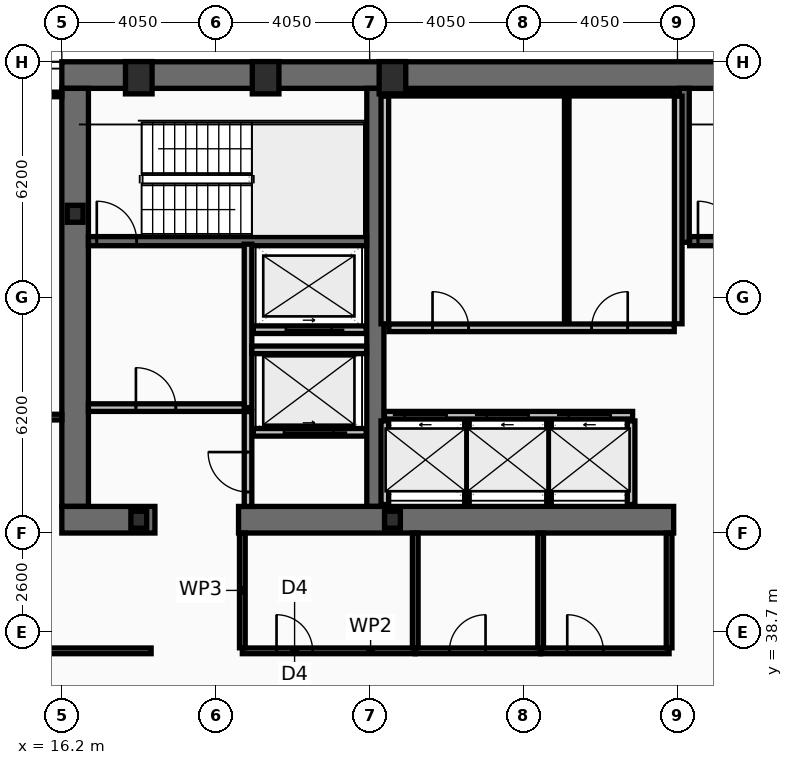
"""IFC4 building model, lengths in metres.
Left out: names, types, materials, properties, quantities, classifications, styles, units other than length and angle.
Written with IfcOpenShell. Run it as: python <this file> out.ifc"""

import sys

from ifc_helpers import new_model, si_unit, direction, frame, frame_2d, origin, origin_2d, place, context, subcontext, project, spatial, rectangle, hollow_rectangle, i_section, extrude, element, fill, save


model = new_model("IFC4")
c1 = context("Model", 3, precision=1e-05, world=origin(), true_north=direction((0.0, 1.0)))
c2 = subcontext(c1, "Body", "Model", "MODEL_VIEW")
j1 = project(units=[si_unit("LENGTHUNIT", "METRE"), si_unit("PLANEANGLEUNIT", "RADIAN")], contexts=[c1])
p1 = place(None, origin())
s1 = spatial("IfcSite", under=j1, at=p1, CompositionType="ELEMENT")
p2 = place(p1, origin())
s2 = spatial("IfcBuilding", under=s1, at=p2, CompositionType="ELEMENT")
p3 = place(p2, frame((0.0, 0.0, 150.6)))
s3 = spatial("IfcBuildingStorey", under=s2, at=p3, CompositionType="ELEMENT", Elevation=150.6)
p4 = place(p3, frame((16.2, 53.35, 0.0), z_axis=(0.0, 0.0, 1.0), x_axis=(1.0, 0.0, 0.0)))
e1 = element("IfcWall", 1, at=p4, inside=s3, PredefinedType="SHEAR", context=c2, shape_type="SweptSolid", body=[
    extrude(rectangle(XDim=40.5, YDim=0.7, at=frame_2d((20.25, 0.0))), origin(), (0.0, 0.0, 1.0), 3.44),
])
p5 = place(p3, frame((16.55, 42.0, 0.0), z_axis=(0.0, 0.0, 1.0), x_axis=(0.0, 1.0, 0.0)))
e2 = element("IfcWall", 2, at=p5, inside=s3, PredefinedType="SHEAR", context=c2, shape_type="SweptSolid", body=[
    extrude(rectangle(XDim=11.0, YDim=0.7, at=frame_2d((5.5, 0.0))), origin(), (0.0, 0.0, 1.0), 3.44),
])
p6 = place(p3, frame((24.45, 42.0, 0.0), z_axis=(0.0, 0.0, 1.0), x_axis=(0.0, 1.0, 0.0)))
e3 = element("IfcWall", 3, at=p6, inside=s3, PredefinedType="SHEAR", context=c2, shape_type="SweptSolid", body=[
    extrude(rectangle(XDim=11.0, YDim=0.45, at=frame_2d((5.5, 0.0))), origin(), (0.0, 0.0, 1.0), 3.44),
])
p7 = place(p3, frame((18.65, 41.65, 0.0), z_axis=(0.0, 0.0, 1.0), x_axis=(-1.0, 0.0, 0.0)))
e4 = element("IfcWall", 4, at=p7, inside=s3, PredefinedType="SHEAR", context=c2, shape_type="SweptSolid", body=[
    extrude(rectangle(XDim=2.45, YDim=0.7, at=frame_2d((1.225, 0.0))), origin(), (0.0, 0.0, 1.0), 3.44),
])
p8 = place(p3, frame((32.3, 41.65, 0.0), z_axis=(0.0, 0.0, 1.0), x_axis=(-1.0, 0.0, 0.0)))
e5 = element("IfcWall", 5, at=p8, inside=s3, PredefinedType="SHEAR", context=c2, shape_type="SweptSolid", body=[
    extrude(rectangle(XDim=11.45, YDim=0.7, at=frame_2d((5.725, 0.0))), origin(), (0.0, 0.0, 1.0), 3.44),
])
p9 = place(p3, frame((32.58, 48.95, 0.0), z_axis=(0.0, 0.0, 1.0), x_axis=(0.0, 1.0, 0.0)))
e6 = element("IfcWall", 6, at=p9, inside=s3, PredefinedType="SHEAR", context=c2, shape_type="SweptSolid", body=[
    extrude(rectangle(XDim=4.05, YDim=0.26, at=frame_2d((2.025, 0.0))), origin(), (0.0, 0.0, 1.0), 3.44),
])
p10 = place(p3, frame((16.9, 48.98, 0.0), z_axis=(0.0, 0.0, 1.0), x_axis=(1.0, 0.0, 0.0)))
e7 = element("IfcWall", 7, at=p10, inside=s3, PredefinedType="SHEAR", context=c2, shape_type="SweptSolid", body=[
    extrude(rectangle(XDim=7.32, YDim=0.24, at=frame_2d((3.66, 0.0))), origin(), (0.0, 0.0, 1.0), 3.44),
])
p11 = place(p10, frame((0.22, 0.0, 0.0)))
e8 = element("IfcOpeningElement", 8, at=p11, cuts=e7, PredefinedType="OPENING", context=c2, shape_type="SweptSolid", body=[
    extrude(rectangle(XDim=1.05, YDim=2.15, at=frame_2d((0.525, 1.075))), frame((0.0, 0.13, 0.0), z_axis=(0.0, -1.0, 0.0), x_axis=(1.0, 0.0, 0.0)), (0.0, 0.0, 1.0), 0.26),
])
p12 = place(p3, frame((32.72, 48.98, 0.0), z_axis=(0.0, 0.0, 1.0), x_axis=(1.0, 0.0, 0.0)))
e9 = element("IfcWall", 9, at=p12, inside=s3, PredefinedType="SHEAR", context=c2, shape_type="SweptSolid", body=[
    extrude(rectangle(XDim=7.56, YDim=0.24, at=frame_2d((3.78, 0.0))), origin(), (0.0, 0.0, 1.0), 3.44),
])
p13 = place(p12, frame((0.22, 0.0, 0.0)))
e10 = element("IfcOpeningElement", 10, at=p13, cuts=e9, PredefinedType="OPENING", context=c2, shape_type="SweptSolid", body=[
    extrude(rectangle(XDim=1.05, YDim=2.15, at=frame_2d((0.525, 1.075))), frame((0.0, 0.13, 0.0), z_axis=(0.0, -1.0, 0.0), x_axis=(1.0, 0.0, 0.0)), (0.0, 0.0, 1.0), 0.26),
])
for number, where, z_axis, x_axis in (
    (11, (18.225, 53.28, 0.0), (0.0, 0.0, 1.0), (1.0, 0.0, 0.0)),
    (12, (21.562, 53.28, 0.0), (0.0, 0.0, 1.0), (1.0, 0.0, 0.0)),
    (13, (24.9, 53.28, 0.0), (0.0, 0.0, 1.0), (1.0, 0.0, 0.0)),
):
    element("IfcColumn", number, at=place(p3, frame(where, z_axis=z_axis, x_axis=x_axis)), inside=s3, PredefinedType="COLUMN", context=c2, shape_type="SweptSolid", body=[
        extrude(hollow_rectangle(XDim=0.7, YDim=0.85, WallThickness=0.05, at=origin_2d()), origin(), (0.0, 0.0, 1.0), 3.6),
    ])
for number, where, z_axis, x_axis in (
    (14, (16.55, 49.7, 0.0), (0.0, 0.0, 1.0), (1.0, 0.0, 0.0)),
    (15, (18.225, 41.65, 0.0), (0.0, 0.0, 1.0), (1.0, 0.0, 0.0)),
    (16, (24.9, 41.65, 0.0), (0.0, 0.0, 1.0), (1.0, 0.0, 0.0)),
):
    element("IfcColumn", number, at=place(p3, frame(where, z_axis=z_axis, x_axis=x_axis)), inside=s3, PredefinedType="COLUMN", context=c2, shape_type="SweptSolid", body=[
        extrude(i_section(OverallWidth=0.416, OverallDepth=0.446, WebThickness=0.039, FlangeThickness=0.063, at=origin_2d()), origin(), (0.0, 0.0, 1.0), 3.6),
    ])
p14 = place(p3, frame((24.69, 44.4, 0.0), z_axis=(0.0, 0.0, 1.0), x_axis=(1.0, 0.0, 0.0)))
e17 = element("IfcWall", 17, at=p14, inside=s3, PredefinedType="PARTITIONING", context=c2, shape_type="SweptSolid", body=[
    extrude(rectangle(XDim=6.53, YDim=0.2, at=frame_2d((3.265, 0.0))), origin(), (0.0, 0.0, 1.0), 3.44),
])
p15 = place(p14, frame((0.53, 0.0, 0.0)))
e18 = element("IfcOpeningElement", 18, at=p15, cuts=e17, PredefinedType="OPENING", context=c2, shape_type="SweptSolid", body=[
    extrude(rectangle(XDim=1.1, YDim=2.18, at=frame_2d((0.55, 1.09))), frame((0.0, 0.11, 0.0), z_axis=(0.0, -1.0, 0.0), x_axis=(1.0, 0.0, 0.0)), (0.0, 0.0, 1.0), 0.22),
])
p16 = place(p14, frame((2.69, 0.0, 0.0)))
e19 = element("IfcOpeningElement", 19, at=p16, cuts=e17, PredefinedType="OPENING", context=c2, shape_type="SweptSolid", body=[
    extrude(rectangle(XDim=1.1, YDim=2.18, at=frame_2d((0.55, 1.09))), frame((0.0, 0.11, 0.0), z_axis=(0.0, -1.0, 0.0), x_axis=(1.0, 0.0, 0.0)), (0.0, 0.0, 1.0), 0.22),
])
p17 = place(p14, frame((4.85, 0.0, 0.0)))
e20 = element("IfcOpeningElement", 20, at=p17, cuts=e17, PredefinedType="OPENING", context=c2, shape_type="SweptSolid", body=[
    extrude(rectangle(XDim=1.1, YDim=2.18, at=frame_2d((0.55, 1.09))), frame((0.0, 0.11, 0.0), z_axis=(0.0, -1.0, 0.0), x_axis=(1.0, 0.0, 0.0)), (0.0, 0.0, 1.0), 0.22),
])
p18 = place(p3, frame((24.21, 43.95, 0.0), z_axis=(0.0, 0.0, 1.0), x_axis=(-1.0, 0.0, 0.0)))
e21 = element("IfcWall", 21, at=p18, inside=s3, PredefinedType="PARTITIONING", context=c2, shape_type="SweptSolid", body=[
    extrude(rectangle(XDim=2.97, YDim=0.2, at=frame_2d((1.485, 0.0))), origin(), (0.0, 0.0, 1.0), 3.44),
])
p19 = place(p18, frame((0.86, 0.0, 0.0)))
e22 = element("IfcOpeningElement", 22, at=p19, cuts=e21, PredefinedType="OPENING", context=c2, shape_type="SweptSolid", body=[
    extrude(rectangle(XDim=1.3, YDim=2.18, at=frame_2d((0.65, 1.09))), frame((0.0, 0.11, 0.0), z_axis=(0.0, -1.0, 0.0), x_axis=(1.0, 0.0, 0.0)), (0.0, 0.0, 1.0), 0.22),
])
p20 = place(p3, frame((24.21, 46.65, 0.0), z_axis=(0.0, 0.0, 1.0), x_axis=(-1.0, 0.0, 0.0)))
e23 = element("IfcWall", 23, at=p20, inside=s3, PredefinedType="PARTITIONING", context=c2, shape_type="SweptSolid", body=[
    extrude(rectangle(XDim=2.97, YDim=0.2, at=frame_2d((1.485, 0.0))), origin(), (0.0, 0.0, 1.0), 3.44),
])
p21 = place(p20, frame((0.91, 0.0, 0.0)))
e24 = element("IfcOpeningElement", 24, at=p21, cuts=e23, PredefinedType="OPENING", context=c2, shape_type="SweptSolid", body=[
    extrude(rectangle(XDim=1.2, YDim=2.18, at=frame_2d((0.6, 1.09))), frame((0.0, 0.11, 0.0), z_axis=(0.0, -1.0, 0.0), x_axis=(1.0, 0.0, 0.0)), (0.0, 0.0, 1.0), 0.22),
])
p22 = place(p3, frame((21.1, 44.6, 0.0), z_axis=(0.0, 0.0, 1.0), x_axis=(0.0, 1.0, 0.0)))
e25 = element("IfcWall", 25, at=p22, inside=s3, PredefinedType="PARTITIONING", context=c2, shape_type="SweptSolid", body=[
    extrude(rectangle(XDim=4.3, YDim=0.2, at=frame_2d((2.15, 0.0))), origin(), (0.0, 0.0, 1.0), 3.44),
])
p23 = place(p3, frame((16.9, 44.6, 0.0), z_axis=(0.0, 0.0, 1.0), x_axis=(1.0, 0.0, 0.0)))
e26 = element("IfcWall", 26, at=p23, inside=s3, PredefinedType="PARTITIONING", context=c2, shape_type="SweptSolid", body=[
    extrude(rectangle(XDim=4.1, YDim=0.2, at=frame_2d((2.05, 0.0))), origin(), (0.0, 0.0, 1.0), 3.44),
])
p24 = place(p23, frame((1.25, 0.0, 0.0)))
e27 = element("IfcOpeningElement", 27, at=p24, cuts=e26, PredefinedType="OPENING", context=c2, shape_type="SweptSolid", body=[
    extrude(rectangle(XDim=1.05, YDim=2.15, at=frame_2d((0.525, 1.075))), frame((0.0, 0.11, 0.0), z_axis=(0.0, -1.0, 0.0), x_axis=(1.0, 0.0, 0.0)), (0.0, 0.0, 1.0), 0.22),
])
p25 = place(p3, frame((21.2, 46.12, 0.0), z_axis=(0.0, 0.0, 1.0), x_axis=(1.0, 0.0, 0.0)))
e28 = element("IfcWall", 28, at=p25, inside=s3, PredefinedType="PARTITIONING", context=c2, shape_type="SweptSolid", body=[
    extrude(rectangle(XDim=3.02, YDim=0.2, at=frame_2d((1.51, 0.0))), origin(), (0.0, 0.0, 1.0), 3.44),
])
p26 = place(p3, frame((21.1, 42.0, 0.0), z_axis=(0.0, 0.0, 1.0), x_axis=(0.0, 1.0, 0.0)))
e29 = element("IfcWall", 29, at=p26, inside=s3, PredefinedType="PARTITIONING", context=c2, shape_type="SweptSolid", body=[
    extrude(rectangle(XDim=2.495, YDim=0.2, at=frame_2d((1.248, 0.0))), origin(), (0.0, 0.0, 1.0), 3.44),
])
p27 = place(p26, frame((0.38, 0.0, 0.0)))
e30 = element("IfcOpeningElement", 30, at=p27, cuts=e29, PredefinedType="OPENING", context=c2, shape_type="SweptSolid", body=[
    extrude(rectangle(XDim=1.05, YDim=2.15, at=frame_2d((0.525, 1.075))), frame((0.0, 0.11, 0.0), z_axis=(0.0, -1.0, 0.0), x_axis=(1.0, 0.0, 0.0)), (0.0, 0.0, 1.0), 0.22),
])
for number, where, z_axis, x_axis in (
    (31, (24.7, 46.805, 0.0), (0.0, 0.0, 1.0), (0.0, 1.0, 0.0)),
    (32, (32.42, 46.805, 0.0), (0.0, 0.0, 1.0), (0.0, 1.0, 0.0)),
):
    element("IfcWall", number, at=place(p3, frame(where, z_axis=z_axis, x_axis=x_axis)), inside=s3, PredefinedType="PARTITIONING", context=c2, shape_type="SweptSolid", body=[
        extrude(rectangle(XDim=5.99, YDim=0.2, at=frame_2d((2.995, 0.0))), origin(), (0.0, 0.0, 1.0), 3.44),
    ])
p28 = place(p3, frame((24.805, 52.86, 0.0), z_axis=(0.0, 0.0, 1.0), x_axis=(1.0, 0.0, 0.0)))
e33 = element("IfcWall", 33, at=p28, inside=s3, PredefinedType="PARTITIONING", context=c2, shape_type="SweptSolid", body=[
    extrude(rectangle(XDim=7.51, YDim=0.12, at=frame_2d((3.755, 0.0))), origin(), (0.0, 0.0, 1.0), 3.44),
])
p29 = place(p3, frame((29.486, 46.805, 0.0), z_axis=(0.0, 0.0, 1.0), x_axis=(0.0, 1.0, 0.0)))
e34 = element("IfcWall", 34, at=p29, inside=s3, PredefinedType="PARTITIONING", context=c2, shape_type="SweptSolid", body=[
    extrude(rectangle(XDim=5.99, YDim=0.12, at=frame_2d((2.995, 0.0))), origin(), (0.0, 0.0, 1.0), 3.44),
])
p30 = place(p3, frame((24.805, 46.7, 0.0), z_axis=(0.0, 0.0, 1.0), x_axis=(1.0, 0.0, 0.0)))
e35 = element("IfcWall", 35, at=p30, inside=s3, PredefinedType="PARTITIONING", context=c2, shape_type="SweptSolid", body=[
    extrude(rectangle(XDim=7.51, YDim=0.2, at=frame_2d((3.755, 0.0))), origin(), (0.0, 0.0, 1.0), 3.44),
])
p31 = place(p30, frame((1.15, 0.0, 0.0)))
e36 = element("IfcOpeningElement", 36, at=p31, cuts=e35, PredefinedType="OPENING", context=c2, shape_type="SweptSolid", body=[
    extrude(rectangle(XDim=0.95, YDim=2.1, at=frame_2d((0.475, 1.05))), frame((0.0, 0.11, 0.0), z_axis=(0.0, -1.0, 0.0), x_axis=(1.0, 0.0, 0.0)), (0.0, 0.0, 1.0), 0.22),
])
p32 = place(p30, frame((5.336, 0.0, 0.0)))
e37 = element("IfcOpeningElement", 37, at=p32, cuts=e35, PredefinedType="OPENING", context=c2, shape_type="SweptSolid", body=[
    extrude(rectangle(XDim=0.95, YDim=2.1, at=frame_2d((0.475, 1.05))), frame((0.0, 0.11, 0.0), z_axis=(0.0, -1.0, 0.0), x_axis=(1.0, 0.0, 0.0)), (0.0, 0.0, 1.0), 0.22),
])
for number, where, z_axis, x_axis in (
    (38, (24.7, 42.05, 0.0), (0.0, 0.0, 1.0), (0.0, 1.0, 0.0)),
    (39, (31.18, 42.05, 0.0), (0.0, 0.0, 1.0), (0.0, 1.0, 0.0)),
):
    element("IfcWall", number, at=place(p3, frame(where, z_axis=z_axis, x_axis=x_axis)), inside=s3, PredefinedType="PARTITIONING", context=c2, shape_type="SweptSolid", body=[
        extrude(rectangle(XDim=2.2, YDim=0.2, at=frame_2d((1.1, 0.0))), origin(), (0.0, 0.0, 1.0), 3.44),
    ])
for number, where, z_axis, x_axis in (
    (40, (26.86, 42.05, 0.0), (0.0, 0.0, 1.0), (0.0, 1.0, 0.0)),
    (41, (29.02, 42.05, 0.0), (0.0, 0.0, 1.0), (0.0, 1.0, 0.0)),
):
    element("IfcWall", number, at=place(p3, frame(where, z_axis=z_axis, x_axis=x_axis)), inside=s3, PredefinedType="PARTITIONING", context=c2, shape_type="SweptSolid", body=[
        extrude(rectangle(XDim=2.2, YDim=0.12, at=frame_2d((1.1, 0.0))), origin(), (0.0, 0.0, 1.0), 3.44),
    ])
p33 = place(p3, frame((20.95, 38.2, 0.0), z_axis=(0.0, 0.0, 1.0), x_axis=(1.0, 0.0, 0.0)))
e42 = element("IfcWall", 42, at=p33, inside=s3, PredefinedType="PARTITIONING", context=c2, shape_type="SweptSolid", body=[
    extrude(rectangle(XDim=4.55, YDim=0.15, at=frame_2d((2.275, 0.0))), origin(), (0.0, 0.0, 1.0), 2.73),
])
p34 = place(p33, frame((0.9, 0.0, 0.0)))
e43 = element("IfcOpeningElement", 43, at=p34, cuts=e42, PredefinedType="OPENING", context=c2, shape_type="SweptSolid", body=[
    extrude(rectangle(XDim=0.95, YDim=2.05, at=frame_2d((0.475, 1.025))), frame((0.0, 0.085, 0.0), z_axis=(0.0, -1.0, 0.0), x_axis=(1.0, 0.0, 0.0)), (0.0, 0.0, 1.0), 0.17),
])
p35 = place(p3, frame((25.5, 38.2, 0.0), z_axis=(0.0, 0.0, 1.0), x_axis=(1.0, 0.0, 0.0)))
e44 = element("IfcWall", 44, at=p35, inside=s3, PredefinedType="PARTITIONING", context=c2, shape_type="SweptSolid", body=[
    extrude(rectangle(XDim=3.3, YDim=0.15, at=frame_2d((1.65, 0.0))), origin(), (0.0, 0.0, 1.0), 3.44),
])
p36 = place(p35, frame((0.9, 0.0, 0.0)))
e45 = element("IfcOpeningElement", 45, at=p36, cuts=e44, PredefinedType="OPENING", context=c2, shape_type="SweptSolid", body=[
    extrude(rectangle(XDim=0.95, YDim=2.05, at=frame_2d((0.475, 1.025))), frame((0.0, 0.085, 0.0), z_axis=(0.0, -1.0, 0.0), x_axis=(1.0, 0.0, 0.0)), (0.0, 0.0, 1.0), 0.17),
])
p37 = place(p3, frame((28.8, 38.2, 0.0), z_axis=(0.0, 0.0, 1.0), x_axis=(1.0, 0.0, 0.0)))
e46 = element("IfcWall", 46, at=p37, inside=s3, PredefinedType="PARTITIONING", context=c2, shape_type="SweptSolid", body=[
    extrude(rectangle(XDim=3.38, YDim=0.15, at=frame_2d((1.69, 0.0))), origin(), (0.0, 0.0, 1.0), 2.73),
])
p38 = place(p37, frame((0.7, 0.0, 0.0)))
e47 = element("IfcOpeningElement", 47, at=p38, cuts=e46, PredefinedType="OPENING", context=c2, shape_type="SweptSolid", body=[
    extrude(rectangle(XDim=0.95, YDim=2.05, at=frame_2d((0.475, 1.025))), frame((0.0, 0.085, 0.0), z_axis=(0.0, -1.0, 0.0), x_axis=(1.0, 0.0, 0.0)), (0.0, 0.0, 1.0), 0.17),
])
for number, where, z_axis, x_axis in (
    (48, (20.95, 38.28, 0.0), (0.0, 0.0, 1.0), (0.0, 1.0, 0.0)),
    (49, (25.5, 38.28, 0.0), (0.0, 0.0, 1.0), (0.0, 1.0, 0.0)),
    (50, (28.8, 38.28, 0.0), (0.0, 0.0, 1.0), (0.0, 1.0, 0.0)),
    (51, (32.18, 38.28, 0.0), (0.0, 0.0, 1.0), (0.0, 1.0, 0.0)),
):
    element("IfcWall", number, at=place(p3, frame(where, z_axis=z_axis, x_axis=x_axis)), inside=s3, PredefinedType="PARTITIONING", context=c2, shape_type="SweptSolid", body=[
        extrude(rectangle(XDim=3.02, YDim=0.15, at=frame_2d((1.51, 0.0))), origin(), (0.0, 0.0, 1.0), 3.44),
    ])
p39 = place(p3, frame((6.03, 38.2, 0.0), z_axis=(0.0, 0.0, 1.0), x_axis=(1.0, 0.0, 0.0)))
e52 = element("IfcWall", 52, at=p39, inside=s3, PredefinedType="PARTITIONING", context=c2, shape_type="SweptSolid", body=[
    extrude(rectangle(XDim=12.52, YDim=0.15, at=frame_2d((6.26, 0.0))), origin(), (0.0, 0.0, 1.0), 2.73),
])
p40 = place(p39, frame((8.32, 0.0, 0.0)))
e53 = element("IfcOpeningElement", 53, at=p40, cuts=e52, PredefinedType="OPENING", context=c2, shape_type="SweptSolid", body=[
    extrude(rectangle(XDim=0.95, YDim=2.05, at=frame_2d((0.475, 1.025))), frame((0.0, 0.085, 0.0), z_axis=(0.0, -1.0, 0.0), x_axis=(1.0, 0.0, 0.0)), (0.0, 0.0, 1.0), 0.17),
])
p41 = place(p3, frame((6.095, 44.35, 0.0), z_axis=(0.0, 0.0, 1.0), x_axis=(1.0, 0.0, 0.0)))
e54 = element("IfcWall", 54, at=p41, inside=s3, PredefinedType="PARTITIONING", context=c2, shape_type="SweptSolid", body=[
    extrude(rectangle(XDim=10.105, YDim=0.15, at=frame_2d((5.052, 0.0))), origin(), (0.0, 0.0, 1.0), 2.83),
])
p42 = place(p41, frame((8.32, 0.0, 0.0)))
e55 = element("IfcOpeningElement", 55, at=p42, cuts=e54, PredefinedType="OPENING", context=c2, shape_type="SweptSolid", body=[
    extrude(rectangle(XDim=0.9, YDim=2.05, at=frame_2d((0.45, 1.025))), frame((0.0, 0.085, 0.0), z_axis=(0.0, -1.0, 0.0), x_axis=(1.0, 0.0, 0.0)), (0.0, 0.0, 1.0), 0.17),
])
p43 = place(p3, frame((6.095, 52.84, 0.0), z_axis=(0.0, 0.0, 1.0), x_axis=(1.0, 0.0, 0.0)))
e56 = element("IfcWall", 56, at=p43, inside=s3, PredefinedType="PARTITIONING", context=c2, shape_type="SweptSolid", body=[
    extrude(rectangle(XDim=10.105, YDim=0.12, at=frame_2d((5.052, 0.0))), origin(), (0.0, 0.0, 1.0), 3.44),
])
p44 = place(p11, origin())
e57 = element("IfcDoor", 57, at=p44, inside=s3, OperationType="SINGLE_SWING_LEFT", PredefinedType="DOOR", context=c2, shape_type="SweptSolid", body=[
    extrude(rectangle(XDim=1.05, YDim=2.15, at=frame_2d((0.525, 1.075))), frame((0.0, 0.025, 0.0), z_axis=(0.0, -1.0, 0.0), x_axis=(1.0, 0.0, 0.0)), (0.0, 0.0, 1.0), 0.05),
])
fill(e8, e57)
p45 = place(p13, origin())
e58 = element("IfcDoor", 58, at=p45, inside=s3, OperationType="SINGLE_SWING_LEFT", PredefinedType="DOOR", context=c2, shape_type="SweptSolid", body=[
    extrude(rectangle(XDim=1.05, YDim=2.15, at=frame_2d((0.525, 1.075))), frame((0.0, 0.025, 0.0), z_axis=(0.0, -1.0, 0.0), x_axis=(1.0, 0.0, 0.0)), (0.0, 0.0, 1.0), 0.05),
])
fill(e10, e58)
p46 = place(p15, origin())
e59 = element("IfcDoor", 59, at=p46, inside=s3, OperationType="SLIDING_TO_LEFT", PredefinedType="DOOR", context=c2, shape_type="SweptSolid", body=[
    extrude(rectangle(XDim=1.1, YDim=2.18, at=frame_2d((0.55, 1.09))), frame((0.0, 0.025, 0.0), z_axis=(0.0, -1.0, 0.0), x_axis=(1.0, 0.0, 0.0)), (0.0, 0.0, 1.0), 0.05),
])
fill(e18, e59)
p47 = place(p16, origin())
e60 = element("IfcDoor", 60, at=p47, inside=s3, OperationType="SLIDING_TO_LEFT", PredefinedType="DOOR", context=c2, shape_type="SweptSolid", body=[
    extrude(rectangle(XDim=1.1, YDim=2.18, at=frame_2d((0.55, 1.09))), frame((0.0, 0.025, 0.0), z_axis=(0.0, -1.0, 0.0), x_axis=(1.0, 0.0, 0.0)), (0.0, 0.0, 1.0), 0.05),
])
fill(e19, e60)
p48 = place(p17, origin())
e61 = element("IfcDoor", 61, at=p48, inside=s3, OperationType="SLIDING_TO_LEFT", PredefinedType="DOOR", context=c2, shape_type="SweptSolid", body=[
    extrude(rectangle(XDim=1.1, YDim=2.18, at=frame_2d((0.55, 1.09))), frame((0.0, 0.025, 0.0), z_axis=(0.0, -1.0, 0.0), x_axis=(1.0, 0.0, 0.0)), (0.0, 0.0, 1.0), 0.05),
])
fill(e20, e61)
p49 = place(p19, origin())
e62 = element("IfcDoor", 62, at=p49, inside=s3, OperationType="SLIDING_TO_LEFT", PredefinedType="DOOR", context=c2, shape_type="SweptSolid", body=[
    extrude(rectangle(XDim=1.3, YDim=2.18, at=frame_2d((0.65, 1.09))), frame((0.0, 0.025, 0.0), z_axis=(0.0, -1.0, 0.0), x_axis=(1.0, 0.0, 0.0)), (0.0, 0.0, 1.0), 0.05),
])
fill(e22, e62)
p50 = place(p21, origin())
e63 = element("IfcDoor", 63, at=p50, inside=s3, OperationType="SLIDING_TO_LEFT", PredefinedType="DOOR", context=c2, shape_type="SweptSolid", body=[
    extrude(rectangle(XDim=1.2, YDim=2.18, at=frame_2d((0.6, 1.09))), frame((0.0, 0.025, 0.0), z_axis=(0.0, -1.0, 0.0), x_axis=(1.0, 0.0, 0.0)), (0.0, 0.0, 1.0), 0.05),
])
fill(e24, e63)
p51 = place(p24, origin())
e64 = element("IfcDoor", 64, at=p51, inside=s3, OperationType="SINGLE_SWING_LEFT", PredefinedType="DOOR", context=c2, shape_type="SweptSolid", body=[
    extrude(rectangle(XDim=1.05, YDim=2.15, at=frame_2d((0.525, 1.075))), frame((0.0, 0.025, 0.0), z_axis=(0.0, -1.0, 0.0), x_axis=(1.0, 0.0, 0.0)), (0.0, 0.0, 1.0), 0.05),
])
fill(e27, e64)
p52 = place(p27, origin())
e65 = element("IfcDoor", 65, at=p52, inside=s3, OperationType="SINGLE_SWING_RIGHT", PredefinedType="DOOR", context=c2, shape_type="SweptSolid", body=[
    extrude(rectangle(XDim=1.05, YDim=2.15, at=frame_2d((0.525, 1.075))), frame((0.0, 0.025, 0.0), z_axis=(0.0, -1.0, 0.0), x_axis=(1.0, 0.0, 0.0)), (0.0, 0.0, 1.0), 0.05),
])
fill(e30, e65)
p53 = place(p31, origin())
e66 = element("IfcDoor", 66, at=p53, inside=s3, OperationType="SINGLE_SWING_LEFT", PredefinedType="DOOR", context=c2, shape_type="SweptSolid", body=[
    extrude(rectangle(XDim=0.95, YDim=2.1, at=frame_2d((0.475, 1.05))), frame((0.0, 0.025, 0.0), z_axis=(0.0, -1.0, 0.0), x_axis=(1.0, 0.0, 0.0)), (0.0, 0.0, 1.0), 0.05),
])
fill(e36, e66)
p54 = place(p32, origin())
e67 = element("IfcDoor", 67, at=p54, inside=s3, OperationType="SINGLE_SWING_RIGHT", PredefinedType="DOOR", context=c2, shape_type="SweptSolid", body=[
    extrude(rectangle(XDim=0.95, YDim=2.1, at=frame_2d((0.475, 1.05))), frame((0.0, 0.025, 0.0), z_axis=(0.0, -1.0, 0.0), x_axis=(1.0, 0.0, 0.0)), (0.0, 0.0, 1.0), 0.05),
])
fill(e37, e67)
p55 = place(p34, origin())
e68 = element("IfcDoor", 68, at=p55, inside=s3, OperationType="SINGLE_SWING_LEFT", PredefinedType="DOOR", context=c2, shape_type="SweptSolid", body=[
    extrude(rectangle(XDim=0.95, YDim=2.05, at=frame_2d((0.475, 1.025))), frame((0.0, 0.025, 0.0), z_axis=(0.0, -1.0, 0.0), x_axis=(1.0, 0.0, 0.0)), (0.0, 0.0, 1.0), 0.05),
])
fill(e43, e68)
p56 = place(p36, origin())
e69 = element("IfcDoor", 69, at=p56, inside=s3, OperationType="SINGLE_SWING_RIGHT", PredefinedType="DOOR", context=c2, shape_type="SweptSolid", body=[
    extrude(rectangle(XDim=0.95, YDim=2.05, at=frame_2d((0.475, 1.025))), frame((0.0, 0.025, 0.0), z_axis=(0.0, -1.0, 0.0), x_axis=(1.0, 0.0, 0.0)), (0.0, 0.0, 1.0), 0.05),
])
fill(e45, e69)
p57 = place(p38, origin())
e70 = element("IfcDoor", 70, at=p57, inside=s3, OperationType="SINGLE_SWING_LEFT", PredefinedType="DOOR", context=c2, shape_type="SweptSolid", body=[
    extrude(rectangle(XDim=0.95, YDim=2.05, at=frame_2d((0.475, 1.025))), frame((0.0, 0.025, 0.0), z_axis=(0.0, -1.0, 0.0), x_axis=(1.0, 0.0, 0.0)), (0.0, 0.0, 1.0), 0.05),
])
fill(e47, e70)
save(model, sys.argv[1])
